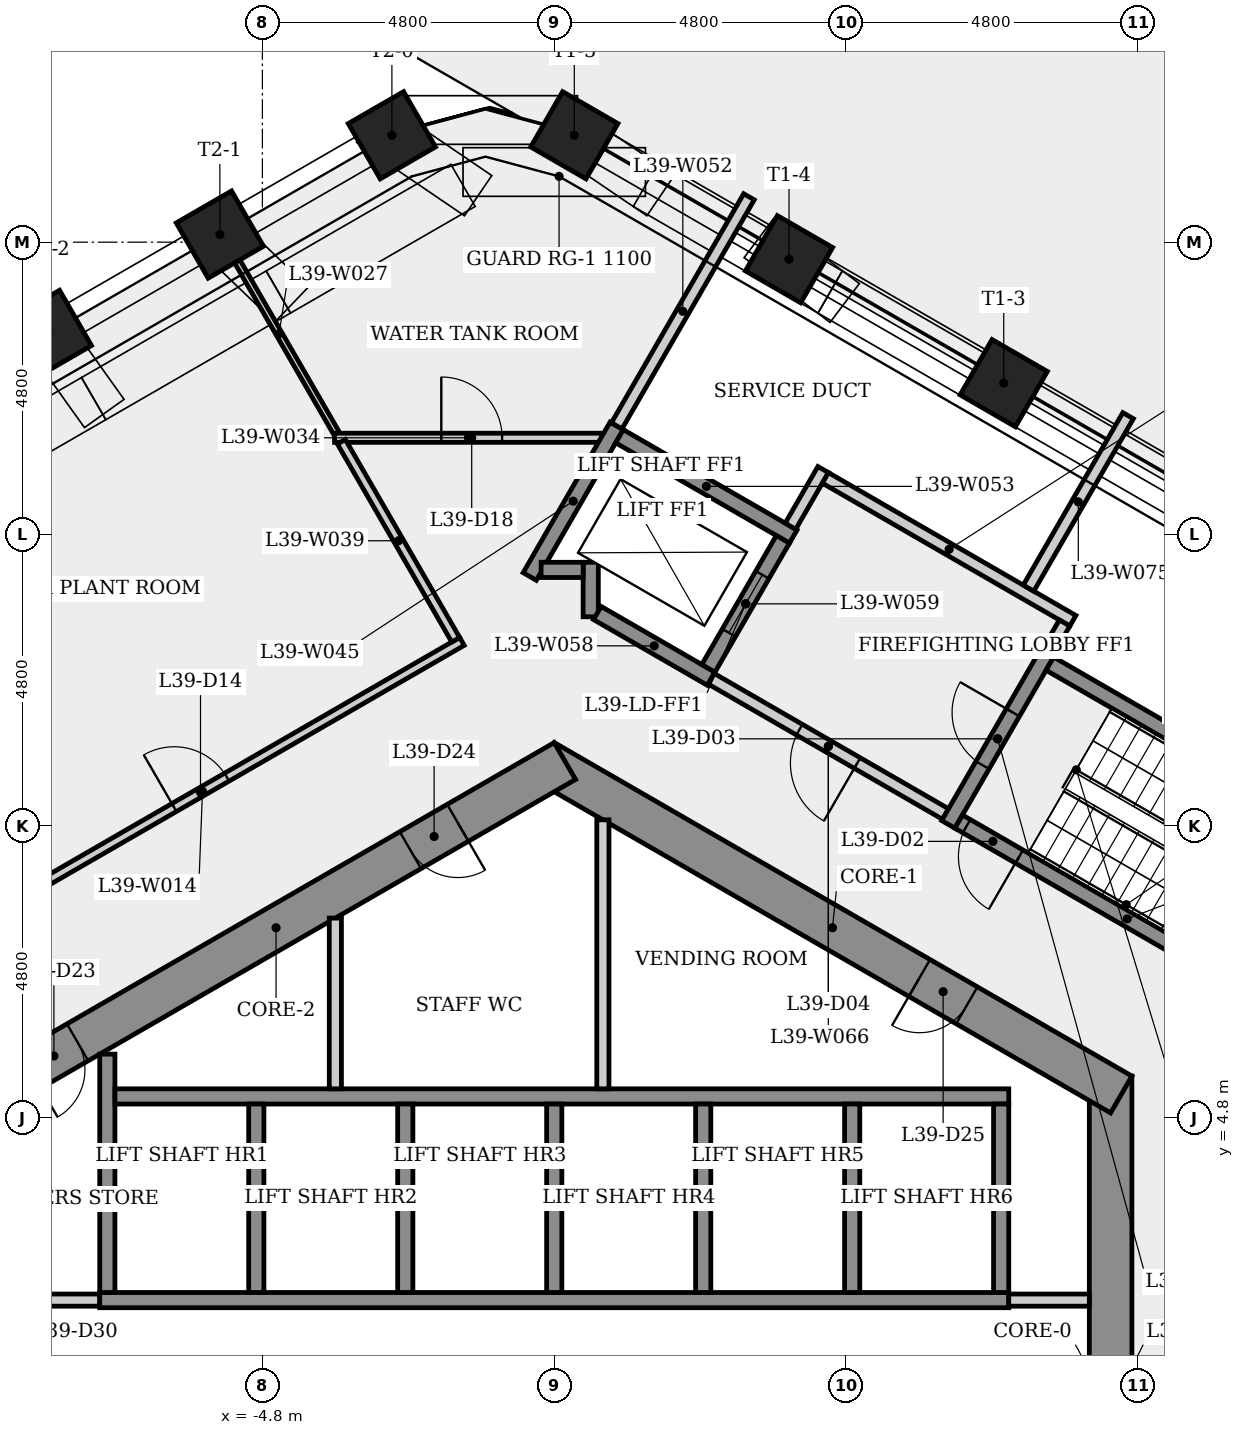
"""IFC4 building model, lengths in metres.
Left out: names, types, materials, properties, quantities, classifications, styles, units other than length and angle.
Written with IfcOpenShell. Run it as: python <this file> out.ifc"""

import sys

from ifc_helpers import new_model, si_unit, direction, frame, frame_2d, origin, origin_2d, place, context, subcontext, project, spatial, rectangle, extrude, element, fill, save


model = new_model("IFC4")
c1 = context("Model", 3, precision=1e-05, world=origin(), true_north=direction((0.0, 1.0)))
c2 = subcontext(c1, "Body", "Model", "MODEL_VIEW")
j1 = project(units=[si_unit("LENGTHUNIT", "METRE"), si_unit("PLANEANGLEUNIT", "RADIAN")], contexts=[c1])
p1 = place(None, origin())
s1 = spatial("IfcSite", under=j1, at=p1, CompositionType="ELEMENT")
p2 = place(p1, origin())
s2 = spatial("IfcBuilding", under=s1, at=p2, CompositionType="ELEMENT")
p3 = place(p2, frame((0.0, 0.0, 147.9)))
s3 = spatial("IfcBuildingStorey", under=s2, at=p3, CompositionType="ELEMENT", Elevation=147.9)
p4 = place(p3, frame((9.15, -5.485, 0.0), z_axis=(0.0, 0.0, 1.0), x_axis=(0.0, 1.0, 0.0)))
e1 = element("IfcWall", 1, at=p4, inside=s3, PredefinedType="SHEAR", context=c2, shape_type="SweptSolid", body=[
    extrude(rectangle(XDim=10.97, YDim=0.7, at=frame_2d((5.485, 0.0))), origin(), (0.0, 0.0, 1.0), 4.8),
])
p5 = place(p4, frame((4.685, 0.0, 0.0)))
e2 = element("IfcOpeningElement", 2, at=p5, cuts=e1, PredefinedType="OPENING", context=c2, shape_type="SweptSolid", body=[
    extrude(rectangle(XDim=1.6, YDim=2.1, at=frame_2d((0.8, 1.05))), frame((0.0, 0.36, 0.0), z_axis=(0.0, -1.0, 0.0), x_axis=(1.0, 0.0, 0.0)), (0.0, 0.0, 1.0), 0.72),
])
p6 = place(p3, frame((9.325, 5.182, 0.0), z_axis=(0.0, 0.0, 1.0), x_axis=(-0.866023993627, 0.500002442456, 0.0)))
e3 = element("IfcWall", 3, at=p6, inside=s3, PredefinedType="SHEAR", context=c2, shape_type="SweptSolid", body=[
    extrude(rectangle(XDim=10.97, YDim=0.7, at=frame_2d((5.485, 0.0))), origin(), (0.0, 0.0, 1.0), 4.8),
])
p7 = place(p6, frame((2.933, 0.0, 0.0)))
e4 = element("IfcOpeningElement", 4, at=p7, cuts=e3, PredefinedType="OPENING", context=c2, shape_type="SweptSolid", body=[
    extrude(rectangle(XDim=0.9, YDim=2.1, at=frame_2d((0.45, 1.05))), frame((0.0, 0.36, 0.0), z_axis=(0.0, -1.0, 0.0), x_axis=(1.0, 0.0, 0.0)), (0.0, 0.0, 1.0), 0.72),
])
p8 = place(p3, frame((0.175, 10.667, 0.0), z_axis=(0.0, 0.0, 1.0), x_axis=(-0.866023993627, -0.500002442456, 0.0)))
e5 = element("IfcWall", 5, at=p8, inside=s3, PredefinedType="SHEAR", context=c2, shape_type="SweptSolid", body=[
    extrude(rectangle(XDim=10.97, YDim=0.7, at=frame_2d((5.485, 0.0))), origin(), (0.0, 0.0, 1.0), 4.8),
])
p9 = place(p8, frame((9.254, 0.0, 0.0)))
e6 = element("IfcOpeningElement", 6, at=p9, cuts=e5, PredefinedType="OPENING", context=c2, shape_type="SweptSolid", body=[
    extrude(rectangle(XDim=0.9, YDim=2.1, at=frame_2d((0.45, 1.05))), frame((0.0, 0.36, 0.0), z_axis=(0.0, -1.0, 0.0), x_axis=(1.0, 0.0, 0.0)), (0.0, 0.0, 1.0), 0.72),
])
p10 = place(p8, frame((2.033, 0.0, 0.0)))
e7 = element("IfcOpeningElement", 7, at=p10, cuts=e5, PredefinedType="OPENING", context=c2, shape_type="SweptSolid", body=[
    extrude(rectangle(XDim=0.9, YDim=2.1, at=frame_2d((0.45, 1.05))), frame((0.0, 0.36, 0.0), z_axis=(0.0, -1.0, 0.0), x_axis=(1.0, 0.0, 0.0)), (0.0, 0.0, 1.0), 0.72),
])
for number, where, z_axis, x_axis in (
    (8, (7.392, 16.881, 0.0), (0.0, 0.0, 1.0), (0.5, 0.866, 0.0)),
    (9, (3.861, 18.92, 0.0), (0.0, 0.0, 1.0), (0.5, 0.866, 0.0)),
    (10, (0.33, 20.958, 0.0), (0.0, 0.0, 1.0), (0.5, 0.866, 0.0)),
    (11, (-2.67, 20.958, 0.0), (0.0, 0.0, 1.0), (-0.5, 0.866, 0.0)),
    (12, (-5.499, 19.325, 0.0), (0.0, 0.0, 1.0), (-0.5, 0.866, 0.0)),
    (13, (-8.328, 17.692, 0.0), (0.0, 0.0, 1.0), (-0.5, 0.866, 0.0)),
):
    element("IfcColumn", number, at=place(p3, frame(where, z_axis=z_axis, x_axis=x_axis)), inside=s3, PredefinedType="COLUMN", context=c2, shape_type="SweptSolid", body=[
        extrude(rectangle(XDim=1.05, YDim=1.05, at=origin_2d()), origin(), (0.0, 0.0, 1.0), 4.45),
    ])
p11 = place(p3, frame((-10.052, 7.706, 0.0), z_axis=(0.0, 0.0, 1.0), x_axis=(0.866017665152, 0.500013403465, 0.0)))
e14 = element("IfcWall", 14, at=p11, inside=s3, PredefinedType="PARTITIONING", context=c2, shape_type="SweptSolid", body=[
    extrude(rectangle(XDim=9.854, YDim=0.15, at=frame_2d((4.927, 0.0))), origin(), (0.0, 0.0, 1.0), 4.45),
])
p12 = place(p11, frame((4.39, 0.0, 0.0)))
e15 = element("IfcOpeningElement", 15, at=p12, cuts=e14, PredefinedType="OPENING", context=c2, shape_type="SweptSolid", body=[
    extrude(rectangle(XDim=1.0, YDim=2.1, at=frame_2d((0.5, 1.05))), frame((0.0, 0.085, 0.0), z_axis=(0.0, -1.0, 0.0), x_axis=(1.0, 0.0, 0.0)), (0.0, 0.0, 1.0), 0.17),
])
p13 = place(p3, frame((-8.8, 1.8, 0.0), z_axis=(0.0, 0.0, 1.0), x_axis=(1.0, 0.0, 0.0)))
e16 = element("IfcWall", 16, at=p13, inside=s3, PredefinedType="PARTITIONING", context=c2, shape_type="SweptSolid", body=[
    extrude(rectangle(XDim=1.325, YDim=0.2, at=frame_2d((0.663, 0.0))), origin(), (0.0, 0.0, 1.0), 4.45),
])
p14 = place(p3, frame((-7.475, 1.8, 0.0), z_axis=(0.0, 0.0, 1.0), x_axis=(1.0, 0.0, 0.0)))
e17 = element("IfcWall", 17, at=p14, inside=s3, PredefinedType="SHEAR", context=c2, shape_type="SweptSolid", body=[
    extrude(rectangle(XDim=14.95, YDim=0.25, at=frame_2d((7.475, 0.0))), origin(), (0.0, 0.0, 1.0), 4.45),
])
p15 = place(p3, frame((-7.35, 1.925, 0.0), z_axis=(0.0, 0.0, 1.0), x_axis=(0.0, 1.0, 0.0)))
e18 = element("IfcWall", 18, at=p15, inside=s3, PredefinedType="SHEAR", context=c2, shape_type="SweptSolid", body=[
    extrude(rectangle(XDim=3.921, YDim=0.25, at=frame_2d((1.96, 0.0))), origin(), (0.0, 0.0, 1.0), 4.45),
])
p16 = place(p3, frame((-7.225, 5.15, 0.0), z_axis=(0.0, 0.0, 1.0), x_axis=(1.0, 0.0, 0.0)))
e19 = element("IfcWall", 19, at=p16, inside=s3, PredefinedType="SHEAR", context=c2, shape_type="SweptSolid", body=[
    extrude(rectangle(XDim=14.7, YDim=0.25, at=frame_2d((7.35, 0.0))), origin(), (0.0, 0.0, 1.0), 4.45),
])
p17 = place(p3, frame((-5.476, 19.339, 0.0), z_axis=(0.0, 0.0, 1.0), x_axis=(0.500015340139, -0.86601654697, 0.0)))
e20 = element("IfcWall", 20, at=p17, inside=s3, PredefinedType="PARTITIONING", context=c2, shape_type="SweptSolid", body=[
    extrude(rectangle(XDim=3.8, YDim=0.1, at=frame_2d((1.9, 0.0))), origin(), (0.0, 0.0, 1.0), 4.45),
])
p18 = place(p3, frame((-4.9, 5.025, 0.0), z_axis=(0.0, 0.0, 1.0), x_axis=(0.0, -1.0, 0.0)))
e21 = element("IfcWall", 21, at=p18, inside=s3, PredefinedType="SHEAR", context=c2, shape_type="SweptSolid", body=[
    extrude(rectangle(XDim=3.1, YDim=0.25, at=frame_2d((1.55, 0.0))), origin(), (0.0, 0.0, 1.0), 4.8),
])
p19 = place(p3, frame((-3.6, 8.083, 0.0), z_axis=(0.0, 0.0, 1.0), x_axis=(0.0, -1.0, 0.0)))
e22 = element("IfcWall", 22, at=p19, inside=s3, PredefinedType="PARTITIONING", context=c2, shape_type="SweptSolid", body=[
    extrude(rectangle(XDim=2.808, YDim=0.2, at=frame_2d((1.404, 0.0))), origin(), (0.0, 0.0, 1.0), 4.45),
])
p20 = place(p3, frame((-3.613, 15.983, 0.0), z_axis=(0.0, 0.0, 1.0), x_axis=(1.0, 0.0, 0.0)))
e23 = element("IfcWall", 23, at=p20, inside=s3, PredefinedType="PARTITIONING", context=c2, shape_type="SweptSolid", body=[
    extrude(rectangle(XDim=4.402, YDim=0.15, at=frame_2d((2.201, 0.0))), origin(), (0.0, 0.0, 1.0), 4.45),
])
p21 = place(p20, frame((1.756, 0.0, 0.0)))
e24 = element("IfcOpeningElement", 24, at=p21, cuts=e23, PredefinedType="OPENING", context=c2, shape_type="SweptSolid", body=[
    extrude(rectangle(XDim=1.0, YDim=2.1, at=frame_2d((0.5, 1.05))), frame((0.0, 0.085, 0.0), z_axis=(0.0, -1.0, 0.0), x_axis=(1.0, 0.0, 0.0)), (0.0, 0.0, 1.0), 0.17),
])
p22 = place(p3, frame((-2.45, 5.025, 0.0), z_axis=(0.0, 0.0, 1.0), x_axis=(0.0, -1.0, 0.0)))
e25 = element("IfcWall", 25, at=p22, inside=s3, PredefinedType="SHEAR", context=c2, shape_type="SweptSolid", body=[
    extrude(rectangle(XDim=3.1, YDim=0.25, at=frame_2d((1.55, 0.0))), origin(), (0.0, 0.0, 1.0), 4.8),
])
p23 = place(p3, frame((-1.621, 12.661, 0.0), z_axis=(0.0, 0.0, 1.0), x_axis=(-0.49997906747, 0.866037488849, 0.0)))
e26 = element("IfcWall", 26, at=p23, inside=s3, PredefinedType="PARTITIONING", context=c2, shape_type="SweptSolid", body=[
    extrude(rectangle(XDim=3.761, YDim=0.15, at=frame_2d((1.88, 0.0))), origin(), (0.0, 0.0, 1.0), 4.45),
])
p24 = place(p3, frame((-0.403, 13.702, 0.0), z_axis=(0.0, 0.0, 1.0), x_axis=(0.499976111731, 0.866039195244, 0.0)))
e27 = element("IfcWall", 27, at=p24, inside=s3, PredefinedType="SHEAR", context=c2, shape_type="SweptSolid", body=[
    extrude(rectangle(XDim=2.861, YDim=0.25, at=frame_2d((1.43, 0.0))), origin(), (0.0, 0.0, 1.0), 4.45),
])
p25 = place(p3, frame((0.0, 5.025, 0.0), z_axis=(0.0, 0.0, 1.0), x_axis=(0.0, -1.0, 0.0)))
e28 = element("IfcWall", 28, at=p25, inside=s3, PredefinedType="SHEAR", context=c2, shape_type="SweptSolid", body=[
    extrude(rectangle(XDim=3.1, YDim=0.25, at=frame_2d((1.55, 0.0))), origin(), (0.0, 0.0, 1.0), 4.8),
])
p26 = place(p3, frame((0.6, 13.039, 0.0), z_axis=(0.0, 0.0, 1.0), x_axis=(0.0, 1.0, 0.0)))
e29 = element("IfcWall", 29, at=p26, inside=s3, PredefinedType="SHEAR", context=c2, shape_type="SweptSolid", body=[
    extrude(rectangle(XDim=0.896, YDim=0.25, at=frame_2d((0.448, 0.0))), origin(), (0.0, 0.0, 1.0), 4.45),
])
p27 = place(p3, frame((0.475, 13.81, 0.0), z_axis=(0.0, 0.0, 1.0), x_axis=(-1.0, 0.0, 0.0)))
e30 = element("IfcWall", 30, at=p27, inside=s3, PredefinedType="SHEAR", context=c2, shape_type="SweptSolid", body=[
    extrude(rectangle(XDim=0.691, YDim=0.25, at=frame_2d((0.345, 0.0))), origin(), (0.0, 0.0, 1.0), 4.8),
])
p28 = place(p3, frame((0.8, 9.699, 0.0), z_axis=(0.0, 0.0, 1.0), x_axis=(0.0, -1.0, 0.0)))
e31 = element("IfcWall", 31, at=p28, inside=s3, PredefinedType="PARTITIONING", context=c2, shape_type="SweptSolid", body=[
    extrude(rectangle(XDim=4.425, YDim=0.2, at=frame_2d((2.212, 0.0))), origin(), (0.0, 0.0, 1.0), 4.45),
])
p29 = place(p3, frame((1.027, 16.179, 0.0), z_axis=(0.0, 0.0, 1.0), x_axis=(0.500013916395, 0.866017369001, 0.0)))
e32 = element("IfcWall", 32, at=p29, inside=s3, PredefinedType="PLUMBINGWALL", context=c2, shape_type="SweptSolid", body=[
    extrude(rectangle(XDim=4.351, YDim=0.2, at=frame_2d((2.175, 0.0))), origin(), (0.0, 0.0, 1.0), 4.45),
])
p30 = place(p3, frame((1.073, 16.008, 0.0), z_axis=(0.0, 0.0, 1.0), x_axis=(0.866040211805, -0.499974350878, 0.0)))
e33 = element("IfcWall", 33, at=p30, inside=s3, PredefinedType="SHEAR", context=c2, shape_type="SweptSolid", body=[
    extrude(rectangle(XDim=3.3, YDim=0.25, at=frame_2d((1.65, 0.0))), origin(), (0.0, 0.0, 1.0), 4.45),
])
p31 = place(p3, frame((2.45, 5.025, 0.0), z_axis=(0.0, 0.0, 1.0), x_axis=(0.0, -1.0, 0.0)))
e34 = element("IfcWall", 34, at=p31, inside=s3, PredefinedType="SHEAR", context=c2, shape_type="SweptSolid", body=[
    extrude(rectangle(XDim=3.1, YDim=0.25, at=frame_2d((1.55, 0.0))), origin(), (0.0, 0.0, 1.0), 4.8),
])
p32 = place(p3, frame((2.581, 12.02, 0.0), z_axis=(0.0, 0.0, 1.0), x_axis=(-0.86603892542, 0.499976579108, 0.0)))
e35 = element("IfcWall", 35, at=p32, inside=s3, PredefinedType="SHEAR", context=c2, shape_type="SweptSolid", body=[
    extrude(rectangle(XDim=2.162, YDim=0.25, at=frame_2d((1.081, 0.0))), origin(), (0.0, 0.0, 1.0), 4.45),
])
p33 = place(p3, frame((2.535, 12.191, 0.0), z_axis=(0.0, 0.0, 1.0), x_axis=(0.500061746146, 0.865989751695, 0.0)))
e36 = element("IfcWall", 36, at=p33, inside=s3, PredefinedType="SHEAR", context=c2, shape_type="SweptSolid", body=[
    extrude(rectangle(XDim=2.45, YDim=0.25, at=frame_2d((1.225, 0.0))), origin(), (0.0, 0.0, 1.0), 4.8),
])
p34 = place(p33, frame((0.675, 0.0, 0.0)))
e37 = element("IfcOpeningElement", 37, at=p34, cuts=e36, PredefinedType="OPENING", context=c2, shape_type="SweptSolid", body=[
    extrude(rectangle(XDim=1.1, YDim=2.1, at=frame_2d((0.55, 1.05))), frame((0.0, 0.135, 0.0), z_axis=(0.0, -1.0, 0.0), x_axis=(1.0, 0.0, 0.0)), (0.0, 0.0, 1.0), 0.27),
])
p35 = place(p3, frame((3.885, 14.529, 0.0), z_axis=(0.0, 0.0, 1.0), x_axis=(0.499997628298, 0.866026773083, 0.0)))
e38 = element("IfcWall", 38, at=p35, inside=s3, PredefinedType="PLUMBINGWALL", context=c2, shape_type="SweptSolid", body=[
    extrude(rectangle(XDim=1.075, YDim=0.2, at=frame_2d((0.538, 0.0))), origin(), (0.0, 0.0, 1.0), 4.45),
])
p36 = place(p3, frame((4.459, 15.323, 0.0), z_axis=(0.0, 0.0, 1.0), x_axis=(0.866016039709, -0.500016218704, 0.0)))
e39 = element("IfcWall", 39, at=p36, inside=s3, PredefinedType="PLUMBINGWALL", context=c2, shape_type="SweptSolid", body=[
    extrude(rectangle(XDim=4.7, YDim=0.2, at=frame_2d((2.35, 0.0))), origin(), (0.0, 0.0, 1.0), 4.45),
])
p37 = place(p3, frame((4.9, 5.025, 0.0), z_axis=(0.0, 0.0, 1.0), x_axis=(0.0, -1.0, 0.0)))
e40 = element("IfcWall", 40, at=p37, inside=s3, PredefinedType="SHEAR", context=c2, shape_type="SweptSolid", body=[
    extrude(rectangle(XDim=3.1, YDim=0.25, at=frame_2d((1.55, 0.0))), origin(), (0.0, 0.0, 1.0), 4.8),
])
p38 = place(p3, frame((6.435, 9.795, 0.0), z_axis=(0.0, 0.0, 1.0), x_axis=(-0.866012907634, 0.500021643343, 0.0)))
e41 = element("IfcWall", 41, at=p38, inside=s3, PredefinedType="PARTITIONING", context=c2, shape_type="SweptSolid", body=[
    extrude(rectangle(XDim=4.45, YDim=0.2, at=frame_2d((2.225, 0.0))), origin(), (0.0, 0.0, 1.0), 4.45),
])
p39 = place(p38, frame((1.675, 0.0, 0.0)))
e42 = element("IfcOpeningElement", 42, at=p39, cuts=e41, PredefinedType="OPENING", context=c2, shape_type="SweptSolid", body=[
    extrude(rectangle(XDim=1.1, YDim=2.1, at=frame_2d((0.55, 1.05))), frame((0.0, 0.11, 0.0), z_axis=(0.0, -1.0, 0.0), x_axis=(1.0, 0.0, 0.0)), (0.0, 0.0, 1.0), 0.22),
])
p40 = place(p3, frame((6.48, 9.624, 0.0), z_axis=(0.0, 0.0, 1.0), x_axis=(0.500017246033, 0.866015446554, 0.0)))
e43 = element("IfcWall", 43, at=p40, inside=s3, PredefinedType="SHEAR", context=c2, shape_type="SweptSolid", body=[
    extrude(rectangle(XDim=3.25, YDim=0.25, at=frame_2d((1.625, 0.0))), origin(), (0.0, 0.0, 1.0), 4.45),
])
p41 = place(p40, frame((1.125, 0.0, 0.0)))
e44 = element("IfcOpeningElement", 44, at=p41, cuts=e43, PredefinedType="OPENING", context=c2, shape_type="SweptSolid", body=[
    extrude(rectangle(XDim=1.0, YDim=2.1, at=frame_2d((0.5, 1.05))), frame((0.0, 0.135, 0.0), z_axis=(0.0, -1.0, 0.0), x_axis=(1.0, 0.0, 0.0)), (0.0, 0.0, 1.0), 0.27),
])
p42 = place(p3, frame((7.475, 1.8, 0.0), z_axis=(0.0, 0.0, 1.0), x_axis=(1.0, 0.0, 0.0)))
e45 = element("IfcWall", 45, at=p42, inside=s3, PredefinedType="PARTITIONING", context=c2, shape_type="SweptSolid", body=[
    extrude(rectangle(XDim=1.325, YDim=0.2, at=frame_2d((0.663, 0.0))), origin(), (0.0, 0.0, 1.0), 4.45),
])
p43 = place(p3, frame((7.35, 5.025, 0.0), z_axis=(0.0, 0.0, 1.0), x_axis=(0.0, -1.0, 0.0)))
e46 = element("IfcWall", 46, at=p43, inside=s3, PredefinedType="SHEAR", context=c2, shape_type="SweptSolid", body=[
    extrude(rectangle(XDim=3.1, YDim=0.25, at=frame_2d((1.55, 0.0))), origin(), (0.0, 0.0, 1.0), 4.8),
])
p44 = place(p3, frame((7.8, 13.51, 0.0), z_axis=(0.0, 0.0, 1.0), x_axis=(0.499986987217, 0.866032916588, 0.0)))
e47 = element("IfcWall", 47, at=p44, inside=s3, PredefinedType="PLUMBINGWALL", context=c2, shape_type="SweptSolid", body=[
    extrude(rectangle(XDim=3.275, YDim=0.2, at=frame_2d((1.638, 0.0))), origin(), (0.0, 0.0, 1.0), 4.45),
])
p45 = place(p3, frame((8.151, 12.268, 0.0), z_axis=(0.0, 0.0, 1.0), x_axis=(0.866025499775, -0.499999833739, 0.0)))
e48 = element("IfcWall", 48, at=p45, inside=s3, PredefinedType="SHEAR", context=c2, shape_type="SweptSolid", body=[
    extrude(rectangle(XDim=6.4, YDim=0.25, at=frame_2d((3.2, 0.0))), origin(), (0.0, 0.0, 1.0), 4.45),
])
p46 = place(p3, frame((8.393, 12.937, 0.0), z_axis=(0.0, 0.0, 1.0), x_axis=(-0.500065409566, -0.86598763626, 0.0)))
e49 = element("IfcWall", 49, at=p46, inside=s3, PredefinedType="PLUMBINGWALL", context=c2, shape_type="SweptSolid", body=[
    extrude(rectangle(XDim=0.575, YDim=0.2, at=frame_2d((0.288, 0.0))), origin(), (0.0, 0.0, 1.0), 4.45),
])
p47 = place(p3, frame((12.194, 6.47, 0.0), z_axis=(0.0, 0.0, 1.0), x_axis=(-0.866025499775, 0.499999833739, 0.0)))
e50 = element("IfcWall", 50, at=p47, inside=s3, PredefinedType="SHEAR", context=c2, shape_type="SweptSolid", body=[
    extrude(rectangle(XDim=6.4, YDim=0.25, at=frame_2d((3.2, 0.0))), origin(), (0.0, 0.0, 1.0), 4.45),
])
p48 = place(p47, frame((5.25, 0.0, 0.0)))
e51 = element("IfcOpeningElement", 51, at=p48, cuts=e50, PredefinedType="OPENING", context=c2, shape_type="SweptSolid", body=[
    extrude(rectangle(XDim=1.0, YDim=2.1, at=frame_2d((0.5, 1.05))), frame((0.0, 0.135, 0.0), z_axis=(0.0, -1.0, 0.0), x_axis=(1.0, 0.0, 0.0)), (0.0, 0.0, 1.0), 0.27),
])
p49 = place(p48, origin())
e52 = element("IfcDoor", 52, at=p49, inside=s3, OperationType="SINGLE_SWING_LEFT", PredefinedType="DOOR", context=c2, shape_type="SweptSolid", body=[
    extrude(rectangle(XDim=1.0, YDim=2.1, at=frame_2d((0.5, 1.05))), frame((0.0, 0.025, 0.0), z_axis=(0.0, -1.0, 0.0), x_axis=(1.0, 0.0, 0.0)), (0.0, 0.0, 1.0), 0.05),
])
fill(e51, e52)
p50 = place(p41, origin())
e53 = element("IfcDoor", 53, at=p50, inside=s3, OperationType="SINGLE_SWING_RIGHT", PredefinedType="DOOR", context=c2, shape_type="SweptSolid", body=[
    extrude(rectangle(XDim=1.0, YDim=2.1, at=frame_2d((0.5, 1.05))), frame((0.0, 0.025, 0.0), z_axis=(0.0, -1.0, 0.0), x_axis=(1.0, 0.0, 0.0)), (0.0, 0.0, 1.0), 0.05),
])
fill(e44, e53)
p51 = place(p39, origin())
e54 = element("IfcDoor", 54, at=p51, inside=s3, OperationType="SINGLE_SWING_LEFT", PredefinedType="DOOR", context=c2, shape_type="SweptSolid", body=[
    extrude(rectangle(XDim=1.1, YDim=2.1, at=frame_2d((0.55, 1.05))), frame((0.0, 0.025, 0.0), z_axis=(0.0, -1.0, 0.0), x_axis=(1.0, 0.0, 0.0)), (0.0, 0.0, 1.0), 0.05),
])
fill(e42, e54)
p52 = place(p34, origin())
e55 = element("IfcDoor", 55, at=p52, inside=s3, OperationType="SLIDING_TO_LEFT", PredefinedType="DOOR", context=c2, shape_type="SweptSolid", body=[
    extrude(rectangle(XDim=1.1, YDim=2.1, at=frame_2d((0.55, 1.05))), frame((0.0, 0.025, 0.0), z_axis=(0.0, -1.0, 0.0), x_axis=(1.0, 0.0, 0.0)), (0.0, 0.0, 1.0), 0.05),
])
fill(e37, e55)
p53 = place(p12, origin())
e56 = element("IfcDoor", 56, at=p53, inside=s3, OperationType="SINGLE_SWING_LEFT", PredefinedType="DOOR", context=c2, shape_type="SweptSolid", body=[
    extrude(rectangle(XDim=1.0, YDim=2.1, at=frame_2d((0.5, 1.05))), frame((0.0, 0.025, 0.0), z_axis=(0.0, -1.0, 0.0), x_axis=(1.0, 0.0, 0.0)), (0.0, 0.0, 1.0), 0.05),
])
fill(e15, e56)
p54 = place(p21, origin())
e57 = element("IfcDoor", 57, at=p54, inside=s3, OperationType="SINGLE_SWING_LEFT", PredefinedType="DOOR", context=c2, shape_type="SweptSolid", body=[
    extrude(rectangle(XDim=1.0, YDim=2.1, at=frame_2d((0.5, 1.05))), frame((0.0, 0.025, 0.0), z_axis=(0.0, -1.0, 0.0), x_axis=(1.0, 0.0, 0.0)), (0.0, 0.0, 1.0), 0.05),
])
fill(e24, e57)
p55 = place(p9, origin())
e58 = element("IfcDoor", 58, at=p55, inside=s3, OperationType="SINGLE_SWING_RIGHT", PredefinedType="DOOR", context=c2, shape_type="SweptSolid", body=[
    extrude(rectangle(XDim=0.9, YDim=2.1, at=frame_2d((0.45, 1.05))), frame((0.0, 0.025, 0.0), z_axis=(0.0, -1.0, 0.0), x_axis=(1.0, 0.0, 0.0)), (0.0, 0.0, 1.0), 0.05),
])
fill(e6, e58)
p56 = place(p10, origin())
e59 = element("IfcDoor", 59, at=p56, inside=s3, OperationType="SINGLE_SWING_LEFT", PredefinedType="DOOR", context=c2, shape_type="SweptSolid", body=[
    extrude(rectangle(XDim=0.9, YDim=2.1, at=frame_2d((0.45, 1.05))), frame((0.0, 0.025, 0.0), z_axis=(0.0, -1.0, 0.0), x_axis=(1.0, 0.0, 0.0)), (0.0, 0.0, 1.0), 0.05),
])
fill(e7, e59)
p57 = place(p7, origin())
e60 = element("IfcDoor", 60, at=p57, inside=s3, OperationType="SINGLE_SWING_RIGHT", PredefinedType="DOOR", context=c2, shape_type="SweptSolid", body=[
    extrude(rectangle(XDim=0.9, YDim=2.1, at=frame_2d((0.45, 1.05))), frame((0.0, 0.025, 0.0), z_axis=(0.0, -1.0, 0.0), x_axis=(1.0, 0.0, 0.0)), (0.0, 0.0, 1.0), 0.05),
])
fill(e4, e60)
save(model, sys.argv[1])
